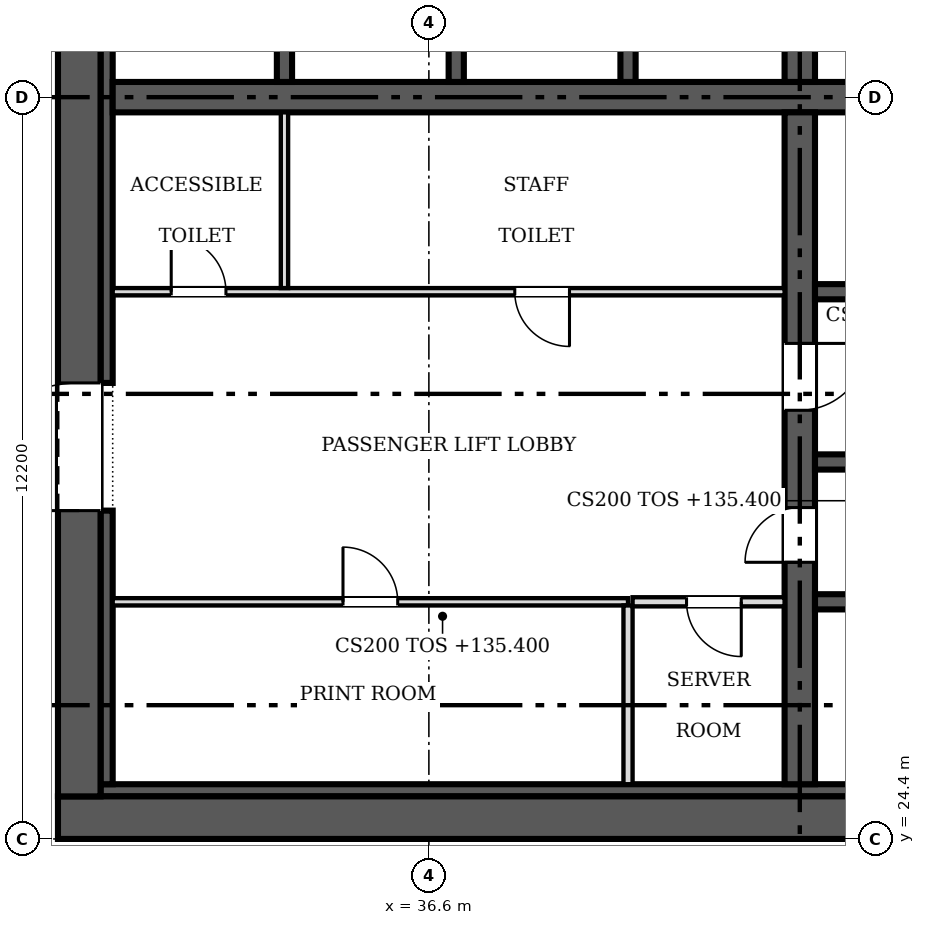
"""IFC4 building model, lengths in metres.
Left out: names, types, materials, properties, quantities, classifications, styles, units other than length and angle.
Written with IfcOpenShell. Run it as: python <this file> out.ifc"""

import sys

from ifc_helpers import new_model, si_unit, direction, frame, frame_2d, origin, place, context, subcontext, project, spatial, rectangle, extrude, source, transform, mapped, element, fill, save


model = new_model("IFC4")
c1 = context("Model", 3, precision=1e-05, world=origin(), true_north=direction((0.0, 1.0)))
c2 = subcontext(c1, "Body", "Model", "MODEL_VIEW")
j1 = project(units=[si_unit("LENGTHUNIT", "METRE"), si_unit("PLANEANGLEUNIT", "RADIAN")], contexts=[c1])
p1 = place(None, origin())
s1 = spatial("IfcSite", under=j1, at=p1, CompositionType="ELEMENT")
p2 = place(p1, origin())
s2 = spatial("IfcBuilding", under=s1, at=p2, CompositionType="ELEMENT")
p3 = place(p2, frame((0.0, 0.0, 135.4)))
s3 = spatial("IfcBuildingStorey", under=s2, at=p3, CompositionType="ELEMENT", Elevation=135.4)
p4 = place(p3, frame((54.9, 24.75, 0.0), z_axis=(0.0, 0.0, 1.0), x_axis=(-1.0, 0.0, 0.0)))
e1 = element("IfcWall", 1, at=p4, inside=s3, PredefinedType="SHEAR", context=c2, shape_type="SweptSolid", body=[
    extrude(rectangle(XDim=24.4, YDim=0.7, at=frame_2d((12.2, 0.0))), origin(), (0.0, 0.0, 1.0), 3.8),
])
m1 = source(origin(), c2, "Body", "SweptSolid", [
    extrude(rectangle(XDim=1.2, YDim=2.1, at=frame_2d((0.6, 1.05))), frame((0.0, 0.36, 0.0), z_axis=(0.0, -1.0, 0.0), x_axis=(1.0, 0.0, 0.0)), (0.0, 0.0, 1.0), 0.72),
])
p5 = place(p4, frame((1.5, 0.0, 0.0)))
e2 = element("IfcOpeningElement", 2, at=p5, cuts=e1, PredefinedType="OPENING", context=c2, shape_type="MappedRepresentation", body=[
    mapped(m1, transform((0.0, 0.0, 0.0), scale=1.0)),
])
p6 = place(p3, frame((30.85, 25.1, 0.0), z_axis=(0.0, 0.0, 1.0), x_axis=(0.0, 1.0, 0.0)))
e3 = element("IfcWall", 3, at=p6, inside=s3, PredefinedType="SHEAR", context=c2, shape_type="SweptSolid", body=[
    extrude(rectangle(XDim=23.0, YDim=0.7, at=frame_2d((11.5, 0.0))), origin(), (0.0, 0.0, 1.0), 3.8),
])
m2 = source(origin(), c2, "Body", "SweptSolid", [
    extrude(rectangle(XDim=2.1, YDim=2.4, at=frame_2d((1.05, 1.2))), frame((0.0, 0.36, 0.0), z_axis=(0.0, -1.0, 0.0), x_axis=(1.0, 0.0, 0.0)), (0.0, 0.0, 1.0), 0.72),
])
p7 = place(p6, frame((4.7, 0.0, 0.0)))
e4 = element("IfcOpeningElement", 4, at=p7, cuts=e3, PredefinedType="OPENING", context=c2, shape_type="MappedRepresentation", body=[
    mapped(m2, transform((0.0, 0.0, 0.0), scale=1.0)),
])
p8 = place(p6, frame((16.2, 0.0, 0.0)))
e5 = element("IfcOpeningElement", 5, at=p8, cuts=e3, PredefinedType="OPENING", context=c2, shape_type="MappedRepresentation", body=[
    mapped(m2, transform((0.0, 0.0, 0.0), scale=1.0)),
])
p9 = place(p3, frame((31.2, 25.2, 0.0), z_axis=(0.0, 0.0, 1.0), x_axis=(1.0, 0.0, 0.0)))
e6 = element("IfcWall", 6, at=p9, inside=s3, PredefinedType="SOLIDWALL", context=c2, shape_type="SweptSolid", body=[
    extrude(rectangle(XDim=21.0, YDim=0.2, at=frame_2d((10.5, 0.0))), origin(), (0.0, 0.0, 1.0), 3.8),
])
p10 = place(p3, frame((31.3, 25.3, 0.0), z_axis=(0.0, 0.0, 1.0), x_axis=(0.0, 1.0, 0.0)))
e7 = element("IfcWall", 7, at=p10, inside=s3, PredefinedType="SOLIDWALL", context=c2, shape_type="SweptSolid", body=[
    extrude(rectangle(XDim=4.5, YDim=0.2, at=frame_2d((2.25, 0.0))), origin(), (0.0, 0.0, 1.0), 3.8),
])
p11 = place(p3, frame((31.3, 31.9, 0.0), z_axis=(0.0, 0.0, 1.0), x_axis=(0.0, 1.0, 0.0)))
e8 = element("IfcWall", 8, at=p11, inside=s3, PredefinedType="SOLIDWALL", context=c2, shape_type="SweptSolid", body=[
    extrude(rectangle(XDim=9.4, YDim=0.2, at=frame_2d((4.7, 0.0))), origin(), (0.0, 0.0, 1.0), 3.8),
])
p12 = place(p3, frame((31.4, 36.6, 0.0), z_axis=(0.0, 0.0, 1.0), x_axis=(1.0, 0.0, 0.0)))
e9 = element("IfcWall", 9, at=p12, inside=s3, PredefinedType="SHEAR", context=c2, shape_type="SweptSolid", body=[
    extrude(rectangle(XDim=16.95, YDim=0.5, at=frame_2d((8.475, 0.0))), origin(), (0.0, 0.0, 1.0), 3.8),
])
p13 = place(p3, frame((42.7, 36.35, 0.0), z_axis=(0.0, 0.0, 1.0), x_axis=(0.0, -1.0, 0.0)))
e10 = element("IfcWall", 10, at=p13, inside=s3, PredefinedType="SHEAR", context=c2, shape_type="SweptSolid", body=[
    extrude(rectangle(XDim=11.05, YDim=0.5, at=frame_2d((5.525, 0.0))), origin(), (0.0, 0.0, 1.0), 3.8),
])
m3 = source(origin(), c2, "Body", "SweptSolid", [
    extrude(rectangle(XDim=0.9, YDim=2.1, at=frame_2d((0.45, 1.05))), frame((0.0, 0.26, 0.0), z_axis=(0.0, -1.0, 0.0), x_axis=(1.0, 0.0, 0.0)), (0.0, 0.0, 1.0), 0.52),
])
p14 = place(p13, frame((6.5, 0.0, 0.0)))
e11 = element("IfcOpeningElement", 11, at=p14, cuts=e10, PredefinedType="OPENING", context=c2, shape_type="MappedRepresentation", body=[
    mapped(m3, transform((0.0, 0.0, 0.0), scale=1.0)),
])
m4 = source(origin(), c2, "Body", "SweptSolid", [
    extrude(rectangle(XDim=1.1, YDim=2.1, at=frame_2d((0.55, 1.05))), frame((0.0, 0.26, 0.0), z_axis=(0.0, -1.0, 0.0), x_axis=(1.0, 0.0, 0.0)), (0.0, 0.0, 1.0), 0.52),
])
p15 = place(p13, frame((3.8, 0.0, 0.0)))
e12 = element("IfcOpeningElement", 12, at=p15, cuts=e10, PredefinedType="OPENING", context=c2, shape_type="MappedRepresentation", body=[
    mapped(m4, transform((0.0, 0.0, 0.0), scale=1.0)),
])
p16 = place(p3, frame((42.7, 36.85, 0.0), z_axis=(0.0, 0.0, 1.0), x_axis=(0.0, 1.0, 0.0)))
e13 = element("IfcWall", 13, at=p16, inside=s3, PredefinedType="SHEAR", context=c2, shape_type="SweptSolid", body=[
    extrude(rectangle(XDim=2.95, YDim=0.5, at=frame_2d((1.475, 0.0))), origin(), (0.0, 0.0, 1.0), 3.8),
])
p17 = place(p3, frame((48.225, 33.4, 0.0), z_axis=(0.0, 0.0, 1.0), x_axis=(-1.0, 0.0, 0.0)))
e14 = element("IfcWall", 14, at=p17, inside=s3, PredefinedType="SOLIDWALL", context=c2, shape_type="SweptSolid", body=[
    extrude(rectangle(XDim=5.275, YDim=0.25, at=frame_2d((2.638, 0.0))), origin(), (0.0, 0.0, 1.0), 3.8),
])
m5 = source(origin(), c2, "Body", "SweptSolid", [
    extrude(rectangle(XDim=1.2, YDim=2.1, at=frame_2d((0.6, 1.05))), frame((0.0, 0.135, 0.0), z_axis=(0.0, -1.0, 0.0), x_axis=(1.0, 0.0, 0.0)), (0.0, 0.0, 1.0), 0.27),
])
p18 = place(p17, frame((3.512, 0.0, 0.0)))
e15 = element("IfcOpeningElement", 15, at=p18, cuts=e14, PredefinedType="OPENING", context=c2, shape_type="MappedRepresentation", body=[
    mapped(m5, transform((0.0, 0.0, 0.0), scale=1.0)),
])
p19 = place(p17, frame((0.688, 0.0, 0.0)))
e16 = element("IfcOpeningElement", 16, at=p19, cuts=e14, PredefinedType="OPENING", context=c2, shape_type="MappedRepresentation", body=[
    mapped(m5, transform((0.0, 0.0, 0.0), scale=1.0)),
])
for number, where, z_axis, x_axis in (
    (17, (42.95, 28.3, 0.0), (0.0, 0.0, 1.0), (1.0, 0.0, 0.0)),
    (18, (42.95, 30.6, 0.0), (0.0, 0.0, 1.0), (1.0, 0.0, 0.0)),
):
    element("IfcWall", number, at=place(p3, frame(where, z_axis=z_axis, x_axis=x_axis)), inside=s3, PredefinedType="SOLIDWALL", context=c2, shape_type="SweptSolid", body=[
        extrude(rectangle(XDim=5.275, YDim=0.25, at=frame_2d((2.638, 0.0))), origin(), (0.0, 0.0, 1.0), 3.8),
    ])
for number, where, z_axis, x_axis in (
    (19, (34.225, 36.85, 0.0), (0.0, 0.0, 1.0), (0.0, 1.0, 0.0)),
    (20, (37.05, 36.85, 0.0), (0.0, 0.0, 1.0), (0.0, 1.0, 0.0)),
    (21, (39.875, 36.85, 0.0), (0.0, 0.0, 1.0), (0.0, 1.0, 0.0)),
):
    element("IfcWall", number, at=place(p3, frame(where, z_axis=z_axis, x_axis=x_axis)), inside=s3, PredefinedType="SOLIDWALL", context=c2, shape_type="SweptSolid", body=[
        extrude(rectangle(XDim=2.825, YDim=0.25, at=frame_2d((1.413, 0.0))), origin(), (0.0, 0.0, 1.0), 3.8),
    ])
p20 = place(p3, frame((31.4, 33.4, 0.0), z_axis=(0.0, 0.0, 1.0), x_axis=(1.0, 0.0, 0.0)))
e22 = element("IfcWall", 22, at=p20, inside=s3, PredefinedType="PARTITIONING", context=c2, shape_type="SweptSolid", body=[
    extrude(rectangle(XDim=11.05, YDim=0.12, at=frame_2d((5.525, 0.0))), origin(), (0.0, 0.0, 1.0), 3.6),
])
m6 = source(origin(), c2, "Body", "SweptSolid", [
    extrude(rectangle(XDim=0.9, YDim=2.1, at=frame_2d((0.45, 1.05))), frame((0.0, 0.07, 0.0), z_axis=(0.0, -1.0, 0.0), x_axis=(1.0, 0.0, 0.0)), (0.0, 0.0, 1.0), 0.14),
])
p21 = place(p20, frame((0.962, 0.0, 0.0)))
e23 = element("IfcOpeningElement", 23, at=p21, cuts=e22, PredefinedType="OPENING", context=c2, shape_type="MappedRepresentation", body=[
    mapped(m6, transform((0.0, 0.0, 0.0), scale=1.0)),
])
p22 = place(p20, frame((6.613, 0.0, 0.0)))
e24 = element("IfcOpeningElement", 24, at=p22, cuts=e22, PredefinedType="OPENING", context=c2, shape_type="MappedRepresentation", body=[
    mapped(m6, transform((0.0, 0.0, 0.0), scale=1.0)),
])
p23 = place(p3, frame((39.875, 28.3, 0.0), z_axis=(0.0, 0.0, 1.0), x_axis=(-1.0, 0.0, 0.0)))
e25 = element("IfcWall", 25, at=p23, inside=s3, PredefinedType="PARTITIONING", context=c2, shape_type="SweptSolid", body=[
    extrude(rectangle(XDim=8.475, YDim=0.12, at=frame_2d((4.238, 0.0))), origin(), (0.0, 0.0, 1.0), 3.6),
])
p24 = place(p23, frame((3.788, 0.0, 0.0)))
e26 = element("IfcOpeningElement", 26, at=p24, cuts=e25, PredefinedType="OPENING", context=c2, shape_type="MappedRepresentation", body=[
    mapped(m6, transform((0.0, 0.0, 0.0), scale=1.0)),
])
p25 = place(p3, frame((34.225, 33.46, 0.0), z_axis=(0.0, 0.0, 1.0), x_axis=(0.0, 1.0, 0.0)))
e27 = element("IfcWall", 27, at=p25, inside=s3, PredefinedType="PARTITIONING", context=c2, shape_type="SweptSolid", body=[
    extrude(rectangle(XDim=2.89, YDim=0.12, at=frame_2d((1.445, 0.0))), origin(), (0.0, 0.0, 1.0), 3.6),
])
p26 = place(p3, frame((39.875, 25.3, 0.0), z_axis=(0.0, 0.0, 1.0), x_axis=(0.0, 1.0, 0.0)))
e28 = element("IfcWall", 28, at=p26, inside=s3, PredefinedType="PARTITIONING", context=c2, shape_type="SweptSolid", body=[
    extrude(rectangle(XDim=2.94, YDim=0.15, at=frame_2d((1.47, 0.0))), origin(), (0.0, 0.0, 1.0), 3.6),
])
p27 = place(p3, frame((42.45, 28.3, 0.0), z_axis=(0.0, 0.0, 1.0), x_axis=(-1.0, 0.0, 0.0)))
e29 = element("IfcWall", 29, at=p27, inside=s3, PredefinedType="PARTITIONING", context=c2, shape_type="SweptSolid", body=[
    extrude(rectangle(XDim=2.5, YDim=0.15, at=frame_2d((1.25, 0.0))), origin(), (0.0, 0.0, 1.0), 3.6),
])
m7 = source(origin(), c2, "Body", "SweptSolid", [
    extrude(rectangle(XDim=0.9, YDim=2.1, at=frame_2d((0.45, 1.05))), frame((0.0, 0.085, 0.0), z_axis=(0.0, -1.0, 0.0), x_axis=(1.0, 0.0, 0.0)), (0.0, 0.0, 1.0), 0.17),
])
p28 = place(p27, frame((0.712, 0.0, 0.0)))
e30 = element("IfcOpeningElement", 30, at=p28, cuts=e29, PredefinedType="OPENING", context=c2, shape_type="MappedRepresentation", body=[
    mapped(m7, transform((0.0, 0.0, 0.0), scale=1.0)),
])
m8 = source(origin(), c2, "Body", "SweptSolid", [
    extrude(rectangle(XDim=2.1, YDim=2.4, at=frame_2d((1.05, 1.2))), frame((0.0, 0.025, 0.0), z_axis=(0.0, -1.0, 0.0), x_axis=(1.0, 0.0, 0.0)), (0.0, 0.0, 1.0), 0.05),
])
p29 = place(p7, origin())
e31 = element("IfcDoor", 31, at=p29, inside=s3, OperationType="DOUBLE_DOOR_SINGLE_SWING", PredefinedType="DOOR", context=c2, shape_type="MappedRepresentation", body=[
    mapped(m8, transform((0.0, 0.0, 0.0), scale=1.0)),
])
fill(e4, e31)
m9 = source(origin(), c2, "Body", "SweptSolid", [
    extrude(rectangle(XDim=0.9, YDim=2.1, at=frame_2d((0.45, 1.05))), frame((0.0, 0.025, 0.0), z_axis=(0.0, -1.0, 0.0), x_axis=(1.0, 0.0, 0.0)), (0.0, 0.0, 1.0), 0.05),
])
p30 = place(p14, origin())
e32 = element("IfcDoor", 32, at=p30, inside=s3, OperationType="SINGLE_SWING_RIGHT", PredefinedType="DOOR", context=c2, shape_type="MappedRepresentation", body=[
    mapped(m9, transform((0.0, 0.0, 0.0), scale=1.0)),
])
fill(e11, e32)
m10 = source(origin(), c2, "Body", "SweptSolid", [
    extrude(rectangle(XDim=1.1, YDim=2.1, at=frame_2d((0.55, 1.05))), frame((0.0, 0.025, 0.0), z_axis=(0.0, -1.0, 0.0), x_axis=(1.0, 0.0, 0.0)), (0.0, 0.0, 1.0), 0.05),
])
p31 = place(p15, origin())
e33 = element("IfcDoor", 33, at=p31, inside=s3, OperationType="SINGLE_SWING_LEFT", PredefinedType="DOOR", context=c2, shape_type="MappedRepresentation", body=[
    mapped(m10, transform((0.0, 0.0, 0.0), scale=1.0)),
])
fill(e12, e33)
p32 = place(p21, origin())
e34 = element("IfcDoor", 34, at=p32, inside=s3, OperationType="SINGLE_SWING_LEFT", PredefinedType="DOOR", context=c2, shape_type="MappedRepresentation", body=[
    mapped(m9, transform((0.0, 0.0, 0.0), scale=1.0)),
])
fill(e23, e34)
p33 = place(p22, origin())
e35 = element("IfcDoor", 35, at=p33, inside=s3, OperationType="SINGLE_SWING_RIGHT", PredefinedType="DOOR", context=c2, shape_type="MappedRepresentation", body=[
    mapped(m9, transform((0.0, 0.0, 0.0), scale=1.0)),
])
fill(e24, e35)
p34 = place(p24, origin())
e36 = element("IfcDoor", 36, at=p34, inside=s3, OperationType="SINGLE_SWING_RIGHT", PredefinedType="DOOR", context=c2, shape_type="MappedRepresentation", body=[
    mapped(m9, transform((0.0, 0.0, 0.0), scale=1.0)),
])
fill(e26, e36)
p35 = place(p28, origin())
e37 = element("IfcDoor", 37, at=p35, inside=s3, OperationType="SINGLE_SWING_LEFT", PredefinedType="DOOR", context=c2, shape_type="MappedRepresentation", body=[
    mapped(m9, transform((0.0, 0.0, 0.0), scale=1.0)),
])
fill(e30, e37)
save(model, sys.argv[1])
